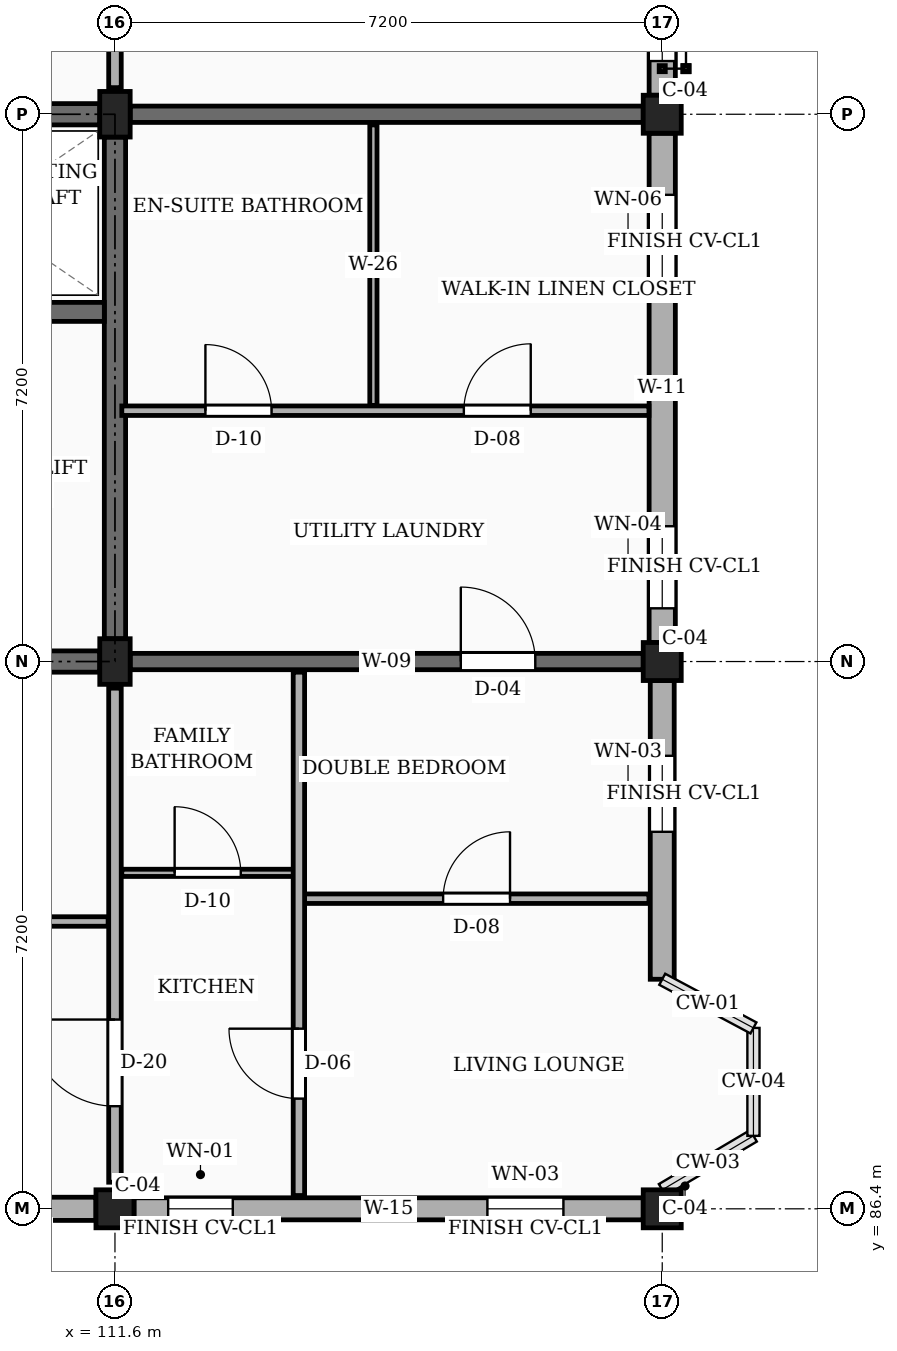
"""IFC4 building model, lengths in metres.
Left out: names, types, materials, properties, quantities, classifications, styles, units other than length and angle.
Written with IfcOpenShell. Run it as: python <this file> out.ifc"""

import sys

from ifc_helpers import new_model, si_unit, direction, frame, frame_2d, origin, origin_2d, place, context, subcontext, project, spatial, rectangle, extrude, element, fill, save


model = new_model("IFC4")
c1 = context("Model", 3, precision=1e-05, world=origin(), true_north=direction((0.0, 1.0)))
c2 = subcontext(c1, "Body", "Model", "MODEL_VIEW")
j1 = project(units=[si_unit("LENGTHUNIT", "METRE"), si_unit("PLANEANGLEUNIT", "RADIAN")], contexts=[c1])
p1 = place(None, origin())
s1 = spatial("IfcSite", under=j1, at=p1, CompositionType="ELEMENT")
p2 = place(p1, origin())
s2 = spatial("IfcBuilding", under=s1, at=p2, CompositionType="ELEMENT")
p3 = place(p2, frame((0.0, 0.0, 26.55)))
s3 = spatial("IfcBuildingStorey", under=s2, at=p3, CompositionType="ELEMENT", Elevation=26.55)
p4 = place(p3, frame((111.6, 86.4, 0.0), z_axis=(0.0, 0.0, 1.0), x_axis=(1.0, 0.0, 0.0)))
e1 = element("IfcColumn", 1, at=p4, inside=s3, PredefinedType="COLUMN", context=c2, shape_type="SweptSolid", body=[
    extrude(rectangle(XDim=0.5, YDim=0.5, at=origin_2d()), origin(), (0.0, 0.0, 1.0), 3.15),
])
for number, where, z_axis, x_axis in (
    (2, (111.6, 93.6, 0.0), (0.0, 0.0, 1.0), (1.0, 0.0, 0.0)),
    (3, (111.6, 100.8, 0.0), (0.0, 0.0, 1.0), (1.0, 0.0, 0.0)),
):
    element("IfcColumn", number, at=place(p3, frame(where, z_axis=z_axis, x_axis=x_axis)), inside=s3, PredefinedType="COLUMN", context=c2, shape_type="SweptSolid", body=[
        extrude(rectangle(XDim=0.4, YDim=0.6, at=origin_2d()), origin(), (0.0, 0.0, 1.0), 3.15),
    ])
for number, where, z_axis, x_axis in (
    (4, (118.8, 86.4, 0.0), (0.0, 0.0, 1.0), (1.0, 0.0, 0.0)),
    (5, (118.8, 93.6, 0.0), (0.0, 0.0, 1.0), (1.0, 0.0, 0.0)),
    (6, (118.8, 100.8, 0.0), (0.0, 0.0, 1.0), (1.0, 0.0, 0.0)),
):
    element("IfcColumn", number, at=place(p3, frame(where, z_axis=z_axis, x_axis=x_axis)), inside=s3, PredefinedType="COLUMN", context=c2, shape_type="SweptSolid", body=[
        extrude(rectangle(XDim=0.5, YDim=0.5, at=origin_2d()), origin(), (0.0, 0.0, 1.0), 3.15),
    ])
p5 = place(p3, frame((111.8, 93.6, 0.0), z_axis=(0.0, 0.0, 1.0), x_axis=(1.0, 0.0, 0.0)))
e7 = element("IfcWall", 7, at=p5, inside=s3, PredefinedType="SOLIDWALL", context=c2, shape_type="SweptSolid", body=[
    extrude(rectangle(XDim=6.75, YDim=0.215, at=frame_2d((3.375, 0.0))), origin(), (0.0, 0.0, 1.0), 2.19),
])
p6 = place(p5, frame((4.35, 0.0, 0.0)))
e8 = element("IfcOpeningElement", 8, at=p6, cuts=e7, PredefinedType="OPENING", context=c2, shape_type="SweptSolid", body=[
    extrude(rectangle(XDim=0.98, YDim=2.12, at=frame_2d((0.49, 1.06))), frame((0.0, 0.118, 0.0), z_axis=(0.0, -1.0, 0.0), x_axis=(1.0, 0.0, 0.0)), (0.0, 0.0, 1.0), 0.235),
])
p7 = place(p3, frame((111.8, 100.8, 0.0), z_axis=(0.0, 0.0, 1.0), x_axis=(1.0, 0.0, 0.0)))
e9 = element("IfcWall", 9, at=p7, inside=s3, PredefinedType="SOLIDWALL", context=c2, shape_type="SweptSolid", body=[
    extrude(rectangle(XDim=6.75, YDim=0.215, at=frame_2d((3.375, 0.0))), origin(), (0.0, 0.0, 1.0), 2.19),
])
p8 = place(p3, frame((104.65, 86.4, 0.0), z_axis=(0.0, 0.0, 1.0), x_axis=(1.0, 0.0, 0.0)))
e10 = element("IfcWall", 10, at=p8, inside=s3, PredefinedType="SOLIDWALL", context=c2, shape_type="SweptSolid", body=[
    extrude(rectangle(XDim=6.7, YDim=0.305, at=frame_2d((3.35, 0.0))), origin(), (0.0, 0.0, 1.0), 2.46),
])
p9 = place(p8, frame((0.45, 0.0, 0.78)))
e11 = element("IfcOpeningElement", 11, at=p9, cuts=e10, PredefinedType="OPENING", context=c2, shape_type="SweptSolid", body=[
    extrude(rectangle(XDim=1.35, YDim=1.44, at=frame_2d((0.675, 0.72))), frame((0.0, 0.163, 0.0), z_axis=(0.0, -1.0, 0.0), x_axis=(1.0, 0.0, 0.0)), (0.0, 0.0, 1.0), 0.325),
])
p10 = place(p8, frame((4.65, 0.0, 0.78)))
e12 = element("IfcOpeningElement", 12, at=p10, cuts=e10, PredefinedType="OPENING", context=c2, shape_type="SweptSolid", body=[
    extrude(rectangle(XDim=0.85, YDim=1.15, at=frame_2d((0.425, 0.575))), frame((0.0, 0.163, 0.0), z_axis=(0.0, -1.0, 0.0), x_axis=(1.0, 0.0, 0.0)), (0.0, 0.0, 1.0), 0.325),
])
p11 = place(p3, frame((111.85, 86.4, 0.0), z_axis=(0.0, 0.0, 1.0), x_axis=(1.0, 0.0, 0.0)))
e13 = element("IfcWall", 13, at=p11, inside=s3, PredefinedType="SOLIDWALL", context=c2, shape_type="SweptSolid", body=[
    extrude(rectangle(XDim=6.7, YDim=0.29, at=frame_2d((3.35, 0.0))), origin(), (0.0, 0.0, 1.0), 2.46),
])
p12 = place(p11, frame((0.45, 0.0, 0.78)))
e14 = element("IfcOpeningElement", 14, at=p12, cuts=e13, PredefinedType="OPENING", context=c2, shape_type="SweptSolid", body=[
    extrude(rectangle(XDim=0.85, YDim=1.15, at=frame_2d((0.425, 0.575))), frame((0.0, 0.155, 0.0), z_axis=(0.0, -1.0, 0.0), x_axis=(1.0, 0.0, 0.0)), (0.0, 0.0, 1.0), 0.31),
])
p13 = place(p11, frame((4.65, 0.0, 0.78)))
e15 = element("IfcOpeningElement", 15, at=p13, cuts=e13, PredefinedType="OPENING", context=c2, shape_type="SweptSolid", body=[
    extrude(rectangle(XDim=1.0, YDim=1.15, at=frame_2d((0.5, 0.575))), frame((0.0, 0.155, 0.0), z_axis=(0.0, -1.0, 0.0), x_axis=(1.0, 0.0, 0.0)), (0.0, 0.0, 1.0), 0.31),
])
p14 = place(p3, frame((118.8, 89.42, 0.0), z_axis=(0.0, 0.0, 1.0), x_axis=(0.0, 1.0, 0.0)))
e16 = element("IfcWall", 16, at=p14, inside=s3, PredefinedType="SOLIDWALL", context=c2, shape_type="SweptSolid", body=[
    extrude(rectangle(XDim=3.93, YDim=0.315, at=frame_2d((1.965, 0.0))), origin(), (0.0, 0.0, 1.0), 2.46),
])
p15 = place(p14, frame((1.94, 0.0, 0.78)))
e17 = element("IfcOpeningElement", 17, at=p15, cuts=e16, PredefinedType="OPENING", context=c2, shape_type="SweptSolid", body=[
    extrude(rectangle(XDim=1.0, YDim=1.15, at=frame_2d((0.5, 0.575))), frame((0.0, 0.167, 0.0), z_axis=(0.0, -1.0, 0.0), x_axis=(1.0, 0.0, 0.0)), (0.0, 0.0, 1.0), 0.335),
])
p16 = place(p3, frame((118.8, 93.85, 0.0), z_axis=(0.0, 0.0, 1.0), x_axis=(0.0, 1.0, 0.0)))
e18 = element("IfcWall", 18, at=p16, inside=s3, PredefinedType="SOLIDWALL", context=c2, shape_type="SweptSolid", body=[
    extrude(rectangle(XDim=6.7, YDim=0.345, at=frame_2d((3.35, 0.0))), origin(), (0.0, 0.0, 1.0), 2.46),
])
p17 = place(p16, frame((0.45, 0.0, 0.78)))
e19 = element("IfcOpeningElement", 19, at=p17, cuts=e18, PredefinedType="OPENING", context=c2, shape_type="SweptSolid", body=[
    extrude(rectangle(XDim=1.08, YDim=1.15, at=frame_2d((0.54, 0.575))), frame((0.0, 0.183, 0.0), z_axis=(0.0, -1.0, 0.0), x_axis=(1.0, 0.0, 0.0)), (0.0, 0.0, 1.0), 0.365),
])
p18 = place(p16, frame((4.65, 0.0, 0.78)))
e20 = element("IfcOpeningElement", 20, at=p18, cuts=e18, PredefinedType="OPENING", context=c2, shape_type="SweptSolid", body=[
    extrude(rectangle(XDim=1.24, YDim=1.15, at=frame_2d((0.62, 0.575))), frame((0.0, 0.183, 0.0), z_axis=(0.0, -1.0, 0.0), x_axis=(1.0, 0.0, 0.0)), (0.0, 0.0, 1.0), 0.365),
])
p19 = place(p3, frame((118.8, 101.05, 0.0), z_axis=(0.0, 0.0, 1.0), x_axis=(0.0, 1.0, 0.0)))
e21 = element("IfcWall", 21, at=p19, inside=s3, PredefinedType="SOLIDWALL", context=c2, shape_type="SweptSolid", body=[
    extrude(rectangle(XDim=6.7, YDim=0.345, at=frame_2d((3.35, 0.0))), origin(), (0.0, 0.0, 1.0), 2.46),
])
p20 = place(p19, frame((0.45, 0.0, 0.78)))
e22 = element("IfcOpeningElement", 22, at=p20, cuts=e21, PredefinedType="OPENING", context=c2, shape_type="SweptSolid", body=[
    extrude(rectangle(XDim=1.24, YDim=1.15, at=frame_2d((0.62, 0.575))), frame((0.0, 0.183, 0.0), z_axis=(0.0, -1.0, 0.0), x_axis=(1.0, 0.0, 0.0)), (0.0, 0.0, 1.0), 0.365),
])
p21 = place(p19, frame((4.65, 0.0, 0.78)))
e23 = element("IfcOpeningElement", 23, at=p21, cuts=e21, PredefinedType="OPENING", context=c2, shape_type="SweptSolid", body=[
    extrude(rectangle(XDim=1.4, YDim=1.15, at=frame_2d((0.7, 0.575))), frame((0.0, 0.183, 0.0), z_axis=(0.0, -1.0, 0.0), x_axis=(1.0, 0.0, 0.0)), (0.0, 0.0, 1.0), 0.365),
])
p22 = place(p3, frame((104.6, 100.8, 0.0), z_axis=(0.0, 0.0, 1.0), x_axis=(1.0, 0.0, 0.0)))
e24 = element("IfcWall", 24, at=p22, inside=s3, PredefinedType="SHEAR", context=c2, shape_type="SweptSolid", body=[
    extrude(rectangle(XDim=6.8, YDim=0.28, at=frame_2d((3.4, 0.0))), origin(), (0.0, 0.0, 1.0), 2.89),
])
p23 = place(p3, frame((111.6, 93.9, 0.0), z_axis=(0.0, 0.0, 1.0), x_axis=(0.0, 1.0, 0.0)))
e25 = element("IfcWall", 25, at=p23, inside=s3, PredefinedType="SHEAR", context=c2, shape_type="SweptSolid", body=[
    extrude(rectangle(XDim=6.6, YDim=0.28, at=frame_2d((3.3, 0.0))), origin(), (0.0, 0.0, 1.0), 2.89),
])
p24 = place(p3, frame((104.6, 93.6, 0.0), z_axis=(0.0, 0.0, 1.0), x_axis=(1.0, 0.0, 0.0)))
e26 = element("IfcWall", 26, at=p24, inside=s3, PredefinedType="SHEAR", context=c2, shape_type="SweptSolid", body=[
    extrude(rectangle(XDim=6.8, YDim=0.28, at=frame_2d((3.4, 0.0))), origin(), (0.0, 0.0, 1.0), 2.89),
])
p25 = place(p24, frame((4.55, 0.0, 0.0)))
e27 = element("IfcOpeningElement", 27, at=p25, cuts=e26, PredefinedType="OPENING", context=c2, shape_type="SweptSolid", body=[
    extrude(rectangle(XDim=1.1, YDim=2.15, at=frame_2d((0.55, 1.075))), frame((0.0, 0.15, 0.0), z_axis=(0.0, -1.0, 0.0), x_axis=(1.0, 0.0, 0.0)), (0.0, 0.0, 1.0), 0.3),
])
p26 = place(p3, frame((108.125, 98.2, 0.0), z_axis=(0.0, 0.0, 1.0), x_axis=(1.0, 0.0, 0.0)))
e28 = element("IfcWall", 28, at=p26, inside=s3, PredefinedType="SHEAR", context=c2, shape_type="SweptSolid", body=[
    extrude(rectangle(XDim=3.335, YDim=0.25, at=frame_2d((1.667, 0.0))), origin(), (0.0, 0.0, 1.0), 2.89),
])
p27 = place(p26, frame((1.1, 0.0, 0.0)))
e29 = element("IfcOpeningElement", 29, at=p27, cuts=e28, PredefinedType="OPENING", context=c2, shape_type="SweptSolid", body=[
    extrude(rectangle(XDim=1.1, YDim=2.2, at=frame_2d((0.55, 1.1))), frame((0.0, 0.135, 0.0), z_axis=(0.0, -1.0, 0.0), x_axis=(1.0, 0.0, 0.0)), (0.0, 0.0, 1.0), 0.27),
])
p28 = place(p3, frame((111.6, 86.75, 0.0), z_axis=(0.0, 0.0, 1.0), x_axis=(0.0, 1.0, 0.0)))
e30 = element("IfcWall", 30, at=p28, inside=s3, PredefinedType="PARTITIONING", context=c2, shape_type="SweptSolid", body=[
    extrude(rectangle(XDim=6.5, YDim=0.165, at=frame_2d((3.25, 0.0))), origin(), (0.0, 0.0, 1.0), 2.325),
])
p29 = place(p28, frame((1.0, 0.0, 0.0)))
e31 = element("IfcOpeningElement", 31, at=p29, cuts=e30, PredefinedType="OPENING", context=c2, shape_type="SweptSolid", body=[
    extrude(rectangle(XDim=1.14, YDim=2.18, at=frame_2d((0.57, 1.09))), frame((0.0, 0.093, 0.0), z_axis=(0.0, -1.0, 0.0), x_axis=(1.0, 0.0, 0.0)), (0.0, 0.0, 1.0), 0.185),
])
p30 = place(p3, frame((111.6, 101.15, 0.0), z_axis=(0.0, 0.0, 1.0), x_axis=(0.0, 1.0, 0.0)))
e32 = element("IfcWall", 32, at=p30, inside=s3, PredefinedType="PARTITIONING", context=c2, shape_type="SweptSolid", body=[
    extrude(rectangle(XDim=6.5, YDim=0.165, at=frame_2d((3.25, 0.0))), origin(), (0.0, 0.0, 1.0), 2.325),
])
p31 = place(p30, frame((1.1, 0.0, 0.0)))
e33 = element("IfcOpeningElement", 33, at=p31, cuts=e32, PredefinedType="OPENING", context=c2, shape_type="SweptSolid", body=[
    extrude(rectangle(XDim=1.0, YDim=2.15, at=frame_2d((0.5, 1.075))), frame((0.0, 0.093, 0.0), z_axis=(0.0, -1.0, 0.0), x_axis=(1.0, 0.0, 0.0)), (0.0, 0.0, 1.0), 0.185),
])
p32 = place(p3, frame((104.49, 90.18, 0.0), z_axis=(0.0, 0.0, 1.0), x_axis=(1.0, 0.0, 0.0)))
e34 = element("IfcWall", 34, at=p32, inside=s3, PredefinedType="PARTITIONING", context=c2, shape_type="SweptSolid", body=[
    extrude(rectangle(XDim=7.02, YDim=0.125, at=frame_2d((3.51, 0.0))), origin(), (0.0, 0.0, 1.0), 2.325),
])
p33 = place(p32, frame((2.85, 0.0, 0.0)))
e35 = element("IfcOpeningElement", 35, at=p33, cuts=e34, PredefinedType="OPENING", context=c2, shape_type="SweptSolid", body=[
    extrude(rectangle(XDim=1.02, YDim=2.15, at=frame_2d((0.51, 1.075))), frame((0.0, 0.073, 0.0), z_axis=(0.0, -1.0, 0.0), x_axis=(1.0, 0.0, 0.0)), (0.0, 0.0, 1.0), 0.145),
])
p34 = place(p3, frame((114.09, 90.48, 0.0), z_axis=(0.0, 0.0, 1.0), x_axis=(1.0, 0.0, 0.0)))
e36 = element("IfcWall", 36, at=p34, inside=s3, PredefinedType="PARTITIONING", context=c2, shape_type="SweptSolid", body=[
    extrude(rectangle(XDim=4.535, YDim=0.125, at=frame_2d((2.268, 0.0))), origin(), (0.0, 0.0, 1.0), 2.325),
])
p35 = place(p34, frame((1.827, 0.0, 0.0)))
e37 = element("IfcOpeningElement", 37, at=p35, cuts=e36, PredefinedType="OPENING", context=c2, shape_type="SweptSolid", body=[
    extrude(rectangle(XDim=0.88, YDim=2.08, at=frame_2d((0.44, 1.04))), frame((0.0, 0.073, 0.0), z_axis=(0.0, -1.0, 0.0), x_axis=(1.0, 0.0, 0.0)), (0.0, 0.0, 1.0), 0.145),
])
p36 = place(p3, frame((111.69, 90.82, 0.0), z_axis=(0.0, 0.0, 1.0), x_axis=(1.0, 0.0, 0.0)))
e38 = element("IfcWall", 38, at=p36, inside=s3, PredefinedType="PARTITIONING", context=c2, shape_type="SweptSolid", body=[
    extrude(rectangle(XDim=2.26, YDim=0.095, at=frame_2d((1.13, 0.0))), origin(), (0.0, 0.0, 1.0), 2.325),
])
p37 = place(p36, frame((0.695, 0.0, 0.0)))
e39 = element("IfcOpeningElement", 39, at=p37, cuts=e38, PredefinedType="OPENING", context=c2, shape_type="SweptSolid", body=[
    extrude(rectangle(XDim=0.87, YDim=2.05, at=frame_2d((0.435, 1.025))), frame((0.0, 0.058, 0.0), z_axis=(0.0, -1.0, 0.0), x_axis=(1.0, 0.0, 0.0)), (0.0, 0.0, 1.0), 0.115),
])
p38 = place(p3, frame((114.02, 86.575, 0.0), z_axis=(0.0, 0.0, 1.0), x_axis=(0.0, 1.0, 0.0)))
e40 = element("IfcWall", 40, at=p38, inside=s3, PredefinedType="PARTITIONING", context=c2, shape_type="SweptSolid", body=[
    extrude(rectangle(XDim=6.885, YDim=0.15, at=frame_2d((3.442, 0.0))), origin(), (0.0, 0.0, 1.0), 2.325),
])
p39 = place(p38, frame((1.275, 0.0, 0.0)))
e41 = element("IfcOpeningElement", 41, at=p39, cuts=e40, PredefinedType="OPENING", context=c2, shape_type="SweptSolid", body=[
    extrude(rectangle(XDim=0.92, YDim=2.1, at=frame_2d((0.46, 1.05))), frame((0.0, 0.085, 0.0), z_axis=(0.0, -1.0, 0.0), x_axis=(1.0, 0.0, 0.0)), (0.0, 0.0, 1.0), 0.17),
])
p40 = place(p3, frame((111.69, 96.9, 0.0), z_axis=(0.0, 0.0, 1.0), x_axis=(1.0, 0.0, 0.0)))
e42 = element("IfcWall", 42, at=p40, inside=s3, PredefinedType="PARTITIONING", context=c2, shape_type="SweptSolid", body=[
    extrude(rectangle(XDim=6.935, YDim=0.125, at=frame_2d((3.468, 0.0))), origin(), (0.0, 0.0, 1.0), 2.325),
])
p41 = place(p40, frame((1.1, 0.0, 0.0)))
e43 = element("IfcOpeningElement", 43, at=p41, cuts=e42, PredefinedType="OPENING", context=c2, shape_type="SweptSolid", body=[
    extrude(rectangle(XDim=0.87, YDim=2.05, at=frame_2d((0.435, 1.025))), frame((0.0, 0.073, 0.0), z_axis=(0.0, -1.0, 0.0), x_axis=(1.0, 0.0, 0.0)), (0.0, 0.0, 1.0), 0.145),
])
p42 = place(p40, frame((4.5, 0.0, 0.0)))
e44 = element("IfcOpeningElement", 44, at=p42, cuts=e42, PredefinedType="OPENING", context=c2, shape_type="SweptSolid", body=[
    extrude(rectangle(XDim=0.88, YDim=2.08, at=frame_2d((0.44, 1.04))), frame((0.0, 0.073, 0.0), z_axis=(0.0, -1.0, 0.0), x_axis=(1.0, 0.0, 0.0)), (0.0, 0.0, 1.0), 0.145),
])
p43 = place(p3, frame((115.0, 96.97, 0.0), z_axis=(0.0, 0.0, 1.0), x_axis=(0.0, 1.0, 0.0)))
e45 = element("IfcWall", 45, at=p43, inside=s3, PredefinedType="PARTITIONING", context=c2, shape_type="SweptSolid", body=[
    extrude(rectangle(XDim=3.69, YDim=0.095, at=frame_2d((1.845, 0.0))), origin(), (0.0, 0.0, 1.0), 2.325),
])
p44 = place(p12, origin())
e46 = element("IfcWindow", 46, at=p44, inside=s3, PartitioningType="SINGLE_PANEL", PredefinedType="WINDOW", context=c2, shape_type="SweptSolid", body=[
    extrude(rectangle(XDim=0.85, YDim=1.15, at=frame_2d((0.425, 0.575))), frame((0.0, 0.03, 0.0), z_axis=(0.0, -1.0, 0.0), x_axis=(1.0, 0.0, 0.0)), (0.0, 0.0, 1.0), 0.06),
])
fill(e14, e46)
p45 = place(p13, origin())
e47 = element("IfcWindow", 47, at=p45, inside=s3, PartitioningType="SINGLE_PANEL", PredefinedType="WINDOW", context=c2, shape_type="SweptSolid", body=[
    extrude(rectangle(XDim=1.0, YDim=1.15, at=frame_2d((0.5, 0.575))), frame((0.0, 0.03, 0.0), z_axis=(0.0, -1.0, 0.0), x_axis=(1.0, 0.0, 0.0)), (0.0, 0.0, 1.0), 0.06),
])
fill(e15, e47)
p46 = place(p15, origin())
e48 = element("IfcWindow", 48, at=p46, inside=s3, PartitioningType="SINGLE_PANEL", PredefinedType="WINDOW", context=c2, shape_type="SweptSolid", body=[
    extrude(rectangle(XDim=1.0, YDim=1.15, at=frame_2d((0.5, 0.575))), frame((0.0, 0.03, 0.0), z_axis=(0.0, -1.0, 0.0), x_axis=(1.0, 0.0, 0.0)), (0.0, 0.0, 1.0), 0.06),
])
fill(e17, e48)
p47 = place(p17, origin())
e49 = element("IfcWindow", 49, at=p47, inside=s3, PartitioningType="SINGLE_PANEL", PredefinedType="WINDOW", context=c2, shape_type="SweptSolid", body=[
    extrude(rectangle(XDim=1.08, YDim=1.15, at=frame_2d((0.54, 0.575))), frame((0.0, 0.03, 0.0), z_axis=(0.0, -1.0, 0.0), x_axis=(1.0, 0.0, 0.0)), (0.0, 0.0, 1.0), 0.06),
])
fill(e19, e49)
p48 = place(p18, origin())
e50 = element("IfcWindow", 50, at=p48, inside=s3, PartitioningType="SINGLE_PANEL", PredefinedType="WINDOW", context=c2, shape_type="SweptSolid", body=[
    extrude(rectangle(XDim=1.24, YDim=1.15, at=frame_2d((0.62, 0.575))), frame((0.0, 0.03, 0.0), z_axis=(0.0, -1.0, 0.0), x_axis=(1.0, 0.0, 0.0)), (0.0, 0.0, 1.0), 0.06),
])
fill(e20, e50)
p49 = place(p20, origin())
e51 = element("IfcWindow", 51, at=p49, inside=s3, PartitioningType="SINGLE_PANEL", PredefinedType="WINDOW", context=c2, shape_type="SweptSolid", body=[
    extrude(rectangle(XDim=1.24, YDim=1.15, at=frame_2d((0.62, 0.575))), frame((0.0, 0.03, 0.0), z_axis=(0.0, -1.0, 0.0), x_axis=(1.0, 0.0, 0.0)), (0.0, 0.0, 1.0), 0.06),
])
fill(e22, e51)
p50 = place(p29, origin())
e52 = element("IfcDoor", 52, at=p50, inside=s3, OperationType="SINGLE_SWING_RIGHT", PredefinedType="DOOR", context=c2, shape_type="SweptSolid", body=[
    extrude(rectangle(XDim=1.14, YDim=2.18, at=frame_2d((0.57, 1.09))), frame((0.0, 0.025, 0.0), z_axis=(0.0, -1.0, 0.0), x_axis=(1.0, 0.0, 0.0)), (0.0, 0.0, 1.0), 0.05),
])
fill(e31, e52)
p51 = place(p35, origin())
e53 = element("IfcDoor", 53, at=p51, inside=s3, OperationType="SINGLE_SWING_RIGHT", PredefinedType="DOOR", context=c2, shape_type="SweptSolid", body=[
    extrude(rectangle(XDim=0.88, YDim=2.08, at=frame_2d((0.44, 1.04))), frame((0.0, 0.025, 0.0), z_axis=(0.0, -1.0, 0.0), x_axis=(1.0, 0.0, 0.0)), (0.0, 0.0, 1.0), 0.05),
])
fill(e37, e53)
p52 = place(p37, origin())
e54 = element("IfcDoor", 54, at=p52, inside=s3, OperationType="SINGLE_SWING_LEFT", PredefinedType="DOOR", context=c2, shape_type="SweptSolid", body=[
    extrude(rectangle(XDim=0.87, YDim=2.05, at=frame_2d((0.435, 1.025))), frame((0.0, 0.025, 0.0), z_axis=(0.0, -1.0, 0.0), x_axis=(1.0, 0.0, 0.0)), (0.0, 0.0, 1.0), 0.05),
])
fill(e39, e54)
p53 = place(p39, origin())
e55 = element("IfcDoor", 55, at=p53, inside=s3, OperationType="SINGLE_SWING_RIGHT", PredefinedType="DOOR", context=c2, shape_type="SweptSolid", body=[
    extrude(rectangle(XDim=0.92, YDim=2.1, at=frame_2d((0.46, 1.05))), frame((0.0, 0.025, 0.0), z_axis=(0.0, -1.0, 0.0), x_axis=(1.0, 0.0, 0.0)), (0.0, 0.0, 1.0), 0.05),
])
fill(e41, e55)
p54 = place(p41, origin())
e56 = element("IfcDoor", 56, at=p54, inside=s3, OperationType="SINGLE_SWING_LEFT", PredefinedType="DOOR", context=c2, shape_type="SweptSolid", body=[
    extrude(rectangle(XDim=0.87, YDim=2.05, at=frame_2d((0.435, 1.025))), frame((0.0, 0.025, 0.0), z_axis=(0.0, -1.0, 0.0), x_axis=(1.0, 0.0, 0.0)), (0.0, 0.0, 1.0), 0.05),
])
fill(e43, e56)
p55 = place(p42, origin())
e57 = element("IfcDoor", 57, at=p55, inside=s3, OperationType="SINGLE_SWING_RIGHT", PredefinedType="DOOR", context=c2, shape_type="SweptSolid", body=[
    extrude(rectangle(XDim=0.88, YDim=2.08, at=frame_2d((0.44, 1.04))), frame((0.0, 0.025, 0.0), z_axis=(0.0, -1.0, 0.0), x_axis=(1.0, 0.0, 0.0)), (0.0, 0.0, 1.0), 0.05),
])
fill(e44, e57)
p56 = place(p6, origin())
e58 = element("IfcDoor", 58, at=p56, inside=s3, OperationType="SINGLE_SWING_LEFT", PredefinedType="DOOR", context=c2, shape_type="SweptSolid", body=[
    extrude(rectangle(XDim=0.98, YDim=2.12, at=frame_2d((0.49, 1.06))), frame((0.0, 0.025, 0.0), z_axis=(0.0, -1.0, 0.0), x_axis=(1.0, 0.0, 0.0)), (0.0, 0.0, 1.0), 0.05),
])
fill(e8, e58)
save(model, sys.argv[1])
